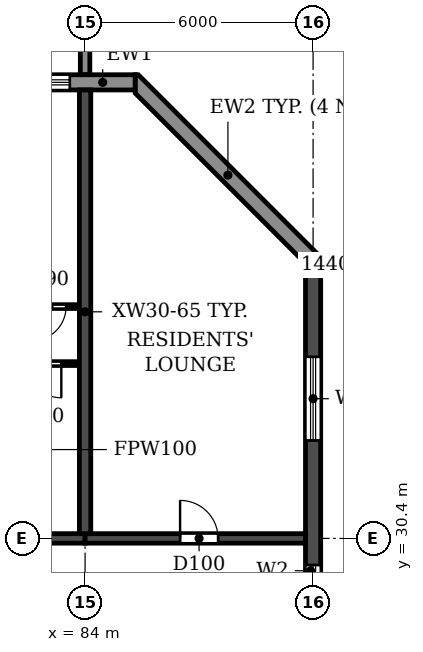
"""IFC4 building model, lengths in metres.
Left out: names, types, materials, properties, quantities, classifications, styles, units other than length and angle.
Written with IfcOpenShell. Run it as: python <this file> out.ifc"""

import sys

from ifc_helpers import new_model, si_unit, direction, frame, frame_2d, origin, place, context, subcontext, project, spatial, polyline, rectangle, outline, extrude, source, transform, mapped, element, fill, save


model = new_model("IFC4")
c1 = context("Model", 3, precision=1e-05, world=origin(), true_north=direction((0.0, 1.0)))
c2 = subcontext(c1, "Body", "Model", "MODEL_VIEW")
j1 = project(units=[si_unit("LENGTHUNIT", "METRE"), si_unit("PLANEANGLEUNIT", "RADIAN")], contexts=[c1])
p1 = place(None, origin())
s1 = spatial("IfcSite", under=j1, at=p1, CompositionType="ELEMENT")
p2 = place(p1, origin())
s2 = spatial("IfcBuilding", under=s1, at=p2, CompositionType="ELEMENT")
p3 = place(p2, frame((0.0, 0.0, 125.7)))
s3 = spatial("IfcBuildingStorey", under=s2, at=p3, CompositionType="ELEMENT", Elevation=125.7)
p4 = place(p3, frame((84.0, 30.525, 0.0), z_axis=(0.0, 0.0, 1.0), x_axis=(0.0, 1.0, 0.0)))
e1 = element("IfcWall", 1, at=p4, inside=s3, PredefinedType="SHEAR", context=c2, shape_type="SweptSolid", body=[
    extrude(rectangle(XDim=11.675, YDim=0.3, at=frame_2d((5.837, 0.0))), origin(), (0.0, 0.0, 1.0), 3.07),
])
p5 = place(p3, frame((90.0, 4.683, 0.0), z_axis=(0.0, 0.0, 1.0), x_axis=(0.0, 1.0, 0.0)))
e2 = element("IfcWall", 2, at=p5, inside=s3, PredefinedType="SHEAR", context=c2, shape_type="SweptSolid", body=[
    extrude(rectangle(XDim=33.034, YDim=0.4, at=frame_2d((16.517, 0.0))), origin(), (0.0, 0.0, 1.0), 3.07),
])
p6 = place(p5, frame((23.817, 0.0, 0.9)))
e3 = element("IfcOpeningElement", 3, at=p6, cuts=e2, PredefinedType="OPENING", context=c2, shape_type="SweptSolid", body=[
    extrude(rectangle(XDim=1.2, YDim=1.5, at=frame_2d((0.6, 0.75))), frame((0.0, 0.21, 0.0), z_axis=(0.0, -1.0, 0.0), x_axis=(1.0, 0.0, 0.0)), (0.0, 0.0, 1.0), 0.42),
])
p7 = place(p5, frame((8.017, 0.0, 0.9)))
e4 = element("IfcOpeningElement", 4, at=p7, cuts=e2, PredefinedType="OPENING", context=c2, shape_type="SweptSolid", body=[
    extrude(rectangle(XDim=1.2, YDim=1.5, at=frame_2d((0.6, 0.75))), frame((0.0, 0.21, 0.0), z_axis=(0.0, -1.0, 0.0), x_axis=(1.0, 0.0, 0.0)), (0.0, 0.0, 1.0), 0.42),
])
p8 = place(p5, frame((28.293, 0.0, 0.6)))
e5 = element("IfcOpeningElement", 5, at=p8, cuts=e2, PredefinedType="OPENING", context=c2, shape_type="SweptSolid", body=[
    extrude(rectangle(XDim=2.2, YDim=1.8, at=frame_2d((1.1, 0.9))), frame((0.0, 0.21, 0.0), z_axis=(0.0, -1.0, 0.0), x_axis=(1.0, 0.0, 0.0)), (0.0, 0.0, 1.0), 0.42),
])
p9 = place(p5, frame((2.541, 0.0, 0.6)))
e6 = element("IfcOpeningElement", 6, at=p9, cuts=e2, PredefinedType="OPENING", context=c2, shape_type="SweptSolid", body=[
    extrude(rectangle(XDim=2.2, YDim=1.8, at=frame_2d((1.1, 0.9))), frame((0.0, 0.21, 0.0), z_axis=(0.0, -1.0, 0.0), x_axis=(1.0, 0.0, 0.0)), (0.0, 0.0, 1.0), 0.42),
])
p10 = place(p3, frame((78.0, 30.4, 0.0), z_axis=(0.0, 0.0, 1.0), x_axis=(1.0, 0.0, 0.0)))
e7 = element("IfcWall", 7, at=p10, inside=s3, PredefinedType="SHEAR", context=c2, shape_type="SweptSolid", body=[
    extrude(rectangle(XDim=6.0, YDim=0.25, at=frame_2d((3.0, 0.0))), origin(), (0.0, 0.0, 1.0), 2.47),
])
p11 = place(p10, frame((2.45, 0.0, 0.0)))
e8 = element("IfcOpeningElement", 8, at=p11, cuts=e7, PredefinedType="OPENING", context=c2, shape_type="SweptSolid", body=[
    extrude(rectangle(XDim=1.0, YDim=2.1, at=frame_2d((0.5, 1.05))), frame((0.0, 0.135, 0.0), z_axis=(0.0, -1.0, 0.0), x_axis=(1.0, 0.0, 0.0)), (0.0, 0.0, 1.0), 0.27),
])
p12 = place(p3, frame((84.0, 30.4, 0.0), z_axis=(0.0, 0.0, 1.0), x_axis=(1.0, 0.0, 0.0)))
e9 = element("IfcWall", 9, at=p12, inside=s3, PredefinedType="SHEAR", context=c2, shape_type="SweptSolid", body=[
    extrude(rectangle(XDim=5.8, YDim=0.25, at=frame_2d((2.9, 0.0))), origin(), (0.0, 0.0, 1.0), 2.47),
])
p13 = place(p12, frame((2.5, 0.0, 0.0)))
e10 = element("IfcOpeningElement", 10, at=p13, cuts=e9, PredefinedType="OPENING", context=c2, shape_type="SweptSolid", body=[
    extrude(rectangle(XDim=1.0, YDim=2.1, at=frame_2d((0.5, 1.05))), frame((0.0, 0.135, 0.0), z_axis=(0.0, -1.0, 0.0), x_axis=(1.0, 0.0, 0.0)), (0.0, 0.0, 1.0), 0.27),
])
p14 = place(p3, origin())
e11 = element("IfcWall", 11, at=p14, inside=s3, PredefinedType="STANDARD", context=c2, shape_type="SweptSolid", body=[
    extrude(outline(polyline([(90.2, 37.717), (90.2, 37.8), (85.4, 42.6), (85.317, 42.6), (85.317, 42.117), (89.717, 37.717), (90.2, 37.717)])), origin(), (0.0, 0.0, 1.0), 3.07),
])
p15 = place(p3, frame((85.317, 42.4, 0.0), z_axis=(0.0, 0.0, 1.0), x_axis=(-1.0, 0.0, 0.0)))
e12 = element("IfcWall", 12, at=p15, inside=s3, PredefinedType="STANDARD", context=c2, shape_type="SweptSolid", body=[
    extrude(rectangle(XDim=68.634, YDim=0.4, at=frame_2d((34.317, 0.0))), origin(), (0.0, 0.0, 1.0), 3.07),
])
p16 = place(p15, frame((64.717, 0.0, 0.9)))
e13 = element("IfcOpeningElement", 13, at=p16, cuts=e12, PredefinedType="OPENING", context=c2, shape_type="SweptSolid", body=[
    extrude(rectangle(XDim=2.2, YDim=1.5, at=frame_2d((1.1, 0.75))), frame((0.0, 0.21, 0.0), z_axis=(0.0, -1.0, 0.0), x_axis=(1.0, 0.0, 0.0)), (0.0, 0.0, 1.0), 0.42),
])
p17 = place(p15, frame((61.917, 0.0, 0.0)))
e14 = element("IfcOpeningElement", 14, at=p17, cuts=e12, PredefinedType="OPENING", context=c2, shape_type="SweptSolid", body=[
    extrude(rectangle(XDim=1.8, YDim=2.4, at=frame_2d((0.9, 1.2))), frame((0.0, 0.21, 0.0), z_axis=(0.0, -1.0, 0.0), x_axis=(1.0, 0.0, 0.0)), (0.0, 0.0, 1.0), 0.42),
])
p18 = place(p15, frame((58.717, 0.0, 0.9)))
e15 = element("IfcOpeningElement", 15, at=p18, cuts=e12, PredefinedType="OPENING", context=c2, shape_type="SweptSolid", body=[
    extrude(rectangle(XDim=2.2, YDim=1.5, at=frame_2d((1.1, 0.75))), frame((0.0, 0.21, 0.0), z_axis=(0.0, -1.0, 0.0), x_axis=(1.0, 0.0, 0.0)), (0.0, 0.0, 1.0), 0.42),
])
p19 = place(p15, frame((55.917, 0.0, 0.0)))
e16 = element("IfcOpeningElement", 16, at=p19, cuts=e12, PredefinedType="OPENING", context=c2, shape_type="SweptSolid", body=[
    extrude(rectangle(XDim=1.8, YDim=2.4, at=frame_2d((0.9, 1.2))), frame((0.0, 0.21, 0.0), z_axis=(0.0, -1.0, 0.0), x_axis=(1.0, 0.0, 0.0)), (0.0, 0.0, 1.0), 0.42),
])
p20 = place(p15, frame((52.717, 0.0, 0.9)))
e17 = element("IfcOpeningElement", 17, at=p20, cuts=e12, PredefinedType="OPENING", context=c2, shape_type="SweptSolid", body=[
    extrude(rectangle(XDim=2.2, YDim=1.5, at=frame_2d((1.1, 0.75))), frame((0.0, 0.21, 0.0), z_axis=(0.0, -1.0, 0.0), x_axis=(1.0, 0.0, 0.0)), (0.0, 0.0, 1.0), 0.42),
])
p21 = place(p15, frame((49.917, 0.0, 0.0)))
e18 = element("IfcOpeningElement", 18, at=p21, cuts=e12, PredefinedType="OPENING", context=c2, shape_type="SweptSolid", body=[
    extrude(rectangle(XDim=1.8, YDim=2.4, at=frame_2d((0.9, 1.2))), frame((0.0, 0.21, 0.0), z_axis=(0.0, -1.0, 0.0), x_axis=(1.0, 0.0, 0.0)), (0.0, 0.0, 1.0), 0.42),
])
p22 = place(p15, frame((46.717, 0.0, 0.9)))
e19 = element("IfcOpeningElement", 19, at=p22, cuts=e12, PredefinedType="OPENING", context=c2, shape_type="SweptSolid", body=[
    extrude(rectangle(XDim=2.2, YDim=1.5, at=frame_2d((1.1, 0.75))), frame((0.0, 0.21, 0.0), z_axis=(0.0, -1.0, 0.0), x_axis=(1.0, 0.0, 0.0)), (0.0, 0.0, 1.0), 0.42),
])
p23 = place(p15, frame((43.917, 0.0, 0.0)))
e20 = element("IfcOpeningElement", 20, at=p23, cuts=e12, PredefinedType="OPENING", context=c2, shape_type="SweptSolid", body=[
    extrude(rectangle(XDim=1.8, YDim=2.4, at=frame_2d((0.9, 1.2))), frame((0.0, 0.21, 0.0), z_axis=(0.0, -1.0, 0.0), x_axis=(1.0, 0.0, 0.0)), (0.0, 0.0, 1.0), 0.42),
])
p24 = place(p15, frame((40.717, 0.0, 0.9)))
e21 = element("IfcOpeningElement", 21, at=p24, cuts=e12, PredefinedType="OPENING", context=c2, shape_type="SweptSolid", body=[
    extrude(rectangle(XDim=2.2, YDim=1.5, at=frame_2d((1.1, 0.75))), frame((0.0, 0.21, 0.0), z_axis=(0.0, -1.0, 0.0), x_axis=(1.0, 0.0, 0.0)), (0.0, 0.0, 1.0), 0.42),
])
p25 = place(p15, frame((37.717, 0.0, 0.9)))
e22 = element("IfcOpeningElement", 22, at=p25, cuts=e12, PredefinedType="OPENING", context=c2, shape_type="SweptSolid", body=[
    extrude(rectangle(XDim=2.2, YDim=1.5, at=frame_2d((1.1, 0.75))), frame((0.0, 0.21, 0.0), z_axis=(0.0, -1.0, 0.0), x_axis=(1.0, 0.0, 0.0)), (0.0, 0.0, 1.0), 0.42),
])
p26 = place(p15, frame((34.917, 0.0, 0.0)))
e23 = element("IfcOpeningElement", 23, at=p26, cuts=e12, PredefinedType="OPENING", context=c2, shape_type="SweptSolid", body=[
    extrude(rectangle(XDim=1.8, YDim=2.4, at=frame_2d((0.9, 1.2))), frame((0.0, 0.21, 0.0), z_axis=(0.0, -1.0, 0.0), x_axis=(1.0, 0.0, 0.0)), (0.0, 0.0, 1.0), 0.42),
])
p27 = place(p15, frame((31.717, 0.0, 0.9)))
e24 = element("IfcOpeningElement", 24, at=p27, cuts=e12, PredefinedType="OPENING", context=c2, shape_type="SweptSolid", body=[
    extrude(rectangle(XDim=2.2, YDim=1.5, at=frame_2d((1.1, 0.75))), frame((0.0, 0.21, 0.0), z_axis=(0.0, -1.0, 0.0), x_axis=(1.0, 0.0, 0.0)), (0.0, 0.0, 1.0), 0.42),
])
p28 = place(p15, frame((28.717, 0.0, 0.9)))
e25 = element("IfcOpeningElement", 25, at=p28, cuts=e12, PredefinedType="OPENING", context=c2, shape_type="SweptSolid", body=[
    extrude(rectangle(XDim=2.2, YDim=1.5, at=frame_2d((1.1, 0.75))), frame((0.0, 0.21, 0.0), z_axis=(0.0, -1.0, 0.0), x_axis=(1.0, 0.0, 0.0)), (0.0, 0.0, 1.0), 0.42),
])
p29 = place(p15, frame((25.717, 0.0, 0.9)))
e26 = element("IfcOpeningElement", 26, at=p29, cuts=e12, PredefinedType="OPENING", context=c2, shape_type="SweptSolid", body=[
    extrude(rectangle(XDim=2.2, YDim=1.5, at=frame_2d((1.1, 0.75))), frame((0.0, 0.21, 0.0), z_axis=(0.0, -1.0, 0.0), x_axis=(1.0, 0.0, 0.0)), (0.0, 0.0, 1.0), 0.42),
])
p30 = place(p15, frame((22.717, 0.0, 0.9)))
e27 = element("IfcOpeningElement", 27, at=p30, cuts=e12, PredefinedType="OPENING", context=c2, shape_type="SweptSolid", body=[
    extrude(rectangle(XDim=2.2, YDim=1.5, at=frame_2d((1.1, 0.75))), frame((0.0, 0.21, 0.0), z_axis=(0.0, -1.0, 0.0), x_axis=(1.0, 0.0, 0.0)), (0.0, 0.0, 1.0), 0.42),
])
p31 = place(p15, frame((19.917, 0.0, 0.0)))
e28 = element("IfcOpeningElement", 28, at=p31, cuts=e12, PredefinedType="OPENING", context=c2, shape_type="SweptSolid", body=[
    extrude(rectangle(XDim=1.8, YDim=2.4, at=frame_2d((0.9, 1.2))), frame((0.0, 0.21, 0.0), z_axis=(0.0, -1.0, 0.0), x_axis=(1.0, 0.0, 0.0)), (0.0, 0.0, 1.0), 0.42),
])
p32 = place(p15, frame((16.917, 0.0, 0.0)))
e29 = element("IfcOpeningElement", 29, at=p32, cuts=e12, PredefinedType="OPENING", context=c2, shape_type="SweptSolid", body=[
    extrude(rectangle(XDim=1.8, YDim=2.4, at=frame_2d((0.9, 1.2))), frame((0.0, 0.21, 0.0), z_axis=(0.0, -1.0, 0.0), x_axis=(1.0, 0.0, 0.0)), (0.0, 0.0, 1.0), 0.42),
])
p33 = place(p15, frame((13.717, 0.0, 0.9)))
e30 = element("IfcOpeningElement", 30, at=p33, cuts=e12, PredefinedType="OPENING", context=c2, shape_type="SweptSolid", body=[
    extrude(rectangle(XDim=2.2, YDim=1.5, at=frame_2d((1.1, 0.75))), frame((0.0, 0.21, 0.0), z_axis=(0.0, -1.0, 0.0), x_axis=(1.0, 0.0, 0.0)), (0.0, 0.0, 1.0), 0.42),
])
p34 = place(p15, frame((10.717, 0.0, 0.9)))
e31 = element("IfcOpeningElement", 31, at=p34, cuts=e12, PredefinedType="OPENING", context=c2, shape_type="SweptSolid", body=[
    extrude(rectangle(XDim=2.2, YDim=1.5, at=frame_2d((1.1, 0.75))), frame((0.0, 0.21, 0.0), z_axis=(0.0, -1.0, 0.0), x_axis=(1.0, 0.0, 0.0)), (0.0, 0.0, 1.0), 0.42),
])
p35 = place(p15, frame((7.717, 0.0, 0.9)))
e32 = element("IfcOpeningElement", 32, at=p35, cuts=e12, PredefinedType="OPENING", context=c2, shape_type="SweptSolid", body=[
    extrude(rectangle(XDim=2.2, YDim=1.5, at=frame_2d((1.1, 0.75))), frame((0.0, 0.21, 0.0), z_axis=(0.0, -1.0, 0.0), x_axis=(1.0, 0.0, 0.0)), (0.0, 0.0, 1.0), 0.42),
])
p36 = place(p15, frame((4.917, 0.0, 0.0)))
e33 = element("IfcOpeningElement", 33, at=p36, cuts=e12, PredefinedType="OPENING", context=c2, shape_type="SweptSolid", body=[
    extrude(rectangle(XDim=1.8, YDim=2.4, at=frame_2d((0.9, 1.2))), frame((0.0, 0.21, 0.0), z_axis=(0.0, -1.0, 0.0), x_axis=(1.0, 0.0, 0.0)), (0.0, 0.0, 1.0), 0.42),
])
p37 = place(p15, frame((1.717, 0.0, 0.9)))
e34 = element("IfcOpeningElement", 34, at=p37, cuts=e12, PredefinedType="OPENING", context=c2, shape_type="SweptSolid", body=[
    extrude(rectangle(XDim=2.2, YDim=1.5, at=frame_2d((1.1, 0.75))), frame((0.0, 0.21, 0.0), z_axis=(0.0, -1.0, 0.0), x_axis=(1.0, 0.0, 0.0)), (0.0, 0.0, 1.0), 0.42),
])
m1 = source(origin(), c2, "Body", "SweptSolid", [
    extrude(outline(polyline([(0.0, 0.0), (0.25, 0.0), (0.25, 3.1), (0.0, 3.1), (0.0, 0.0)])), origin(), (0.0, 0.0, 1.0), 3.1),
])
p38 = place(p3, frame((83.875, 42.6, 0.0)))
e35 = element("IfcWall", 35, at=p38, inside=s3, PredefinedType="STANDARD", context=c2, shape_type="MappedRepresentation", body=[
    mapped(m1, transform((0.0, 0.0, 0.0))),
])
p39 = place(p3, frame((81.8, 35.0, 0.0), z_axis=(0.0, 0.0, 1.0), x_axis=(1.0, 0.0, 0.0)))
e36 = element("IfcWall", 36, at=p39, inside=s3, PredefinedType="PARTITIONING", context=c2, shape_type="SweptSolid", body=[
    extrude(rectangle(XDim=2.04, YDim=0.1, at=frame_2d((1.02, 0.0))), origin(), (0.0, 0.0, 1.0), 3.07),
])
p40 = place(p39, frame((0.675, 0.0, 0.0)))
e37 = element("IfcOpeningElement", 37, at=p40, cuts=e36, PredefinedType="OPENING", context=c2, shape_type="SweptSolid", body=[
    extrude(rectangle(XDim=0.9, YDim=2.1, at=frame_2d((0.45, 1.05))), frame((0.0, 0.06, 0.0), z_axis=(0.0, -1.0, 0.0), x_axis=(1.0, 0.0, 0.0)), (0.0, 0.0, 1.0), 0.12),
])
p41 = place(p3, frame((80.95, 36.5, 0.0), z_axis=(0.0, 0.0, 1.0), x_axis=(1.0, 0.0, 0.0)))
e38 = element("IfcWall", 38, at=p41, inside=s3, PredefinedType="PARTITIONING", context=c2, shape_type="SweptSolid", body=[
    extrude(rectangle(XDim=2.89, YDim=0.1, at=frame_2d((1.445, 0.0))), origin(), (0.0, 0.0, 1.0), 3.07),
])
p42 = place(p41, frame((1.65, 0.0, 0.0)))
e39 = element("IfcOpeningElement", 39, at=p42, cuts=e38, PredefinedType="OPENING", context=c2, shape_type="SweptSolid", body=[
    extrude(rectangle(XDim=0.9, YDim=2.1, at=frame_2d((0.45, 1.05))), frame((0.0, 0.06, 0.0), z_axis=(0.0, -1.0, 0.0), x_axis=(1.0, 0.0, 0.0)), (0.0, 0.0, 1.0), 0.12),
])
p43 = place(p6, origin())
e40 = element("IfcWindow", 40, at=p43, inside=s3, PartitioningType="SINGLE_PANEL", PredefinedType="WINDOW", context=c2, shape_type="SweptSolid", body=[
    extrude(rectangle(XDim=1.2, YDim=1.5, at=frame_2d((0.6, 0.75))), frame((0.0, 0.03, 0.0), z_axis=(0.0, -1.0, 0.0), x_axis=(1.0, 0.0, 0.0)), (0.0, 0.0, 1.0), 0.06),
])
fill(e3, e40)
p44 = place(p8, origin())
e41 = element("IfcWindow", 41, at=p44, inside=s3, PartitioningType="DOUBLE_PANEL_HORIZONTAL", PredefinedType="WINDOW", context=c2, shape_type="SweptSolid", body=[
    extrude(rectangle(XDim=2.2, YDim=1.8, at=frame_2d((1.1, 0.9))), frame((0.0, 0.03, 0.0), z_axis=(0.0, -1.0, 0.0), x_axis=(1.0, 0.0, 0.0)), (0.0, 0.0, 1.0), 0.06),
])
fill(e5, e41)
p45 = place(p37, origin())
e42 = element("IfcWindow", 42, at=p45, inside=s3, PartitioningType="DOUBLE_PANEL_HORIZONTAL", PredefinedType="WINDOW", context=c2, shape_type="SweptSolid", body=[
    extrude(rectangle(XDim=2.2, YDim=1.5, at=frame_2d((1.1, 0.75))), frame((0.0, 0.03, 0.0), z_axis=(0.0, -1.0, 0.0), x_axis=(1.0, 0.0, 0.0)), (0.0, 0.0, 1.0), 0.06),
])
fill(e34, e42)
p46 = place(p40, frame((0.9, 0.0, 0.0), z_axis=(0.0, 0.0, 1.0), x_axis=(-1.0, 0.0, 0.0)))
e43 = element("IfcDoor", 43, at=p46, inside=s3, OperationType="SINGLE_SWING_LEFT", PredefinedType="DOOR", context=c2, shape_type="SweptSolid", body=[
    extrude(rectangle(XDim=0.9, YDim=2.1, at=frame_2d((0.45, 1.05))), frame((0.0, 0.025, 0.0), z_axis=(0.0, -1.0, 0.0), x_axis=(1.0, 0.0, 0.0)), (0.0, 0.0, 1.0), 0.05),
])
fill(e37, e43)
p47 = place(p42, frame((0.9, 0.0, 0.0), z_axis=(0.0, 0.0, 1.0), x_axis=(-1.0, 0.0, 0.0)))
e44 = element("IfcDoor", 44, at=p47, inside=s3, OperationType="SINGLE_SWING_RIGHT", PredefinedType="DOOR", context=c2, shape_type="SweptSolid", body=[
    extrude(rectangle(XDim=0.9, YDim=2.1, at=frame_2d((0.45, 1.05))), frame((0.0, 0.025, 0.0), z_axis=(0.0, -1.0, 0.0), x_axis=(1.0, 0.0, 0.0)), (0.0, 0.0, 1.0), 0.05),
])
fill(e39, e44)
p48 = place(p13, origin())
e45 = element("IfcDoor", 45, at=p48, inside=s3, OperationType="SINGLE_SWING_LEFT", PredefinedType="DOOR", context=c2, shape_type="SweptSolid", body=[
    extrude(rectangle(XDim=1.0, YDim=2.1, at=frame_2d((0.5, 1.05))), frame((0.0, 0.025, 0.0), z_axis=(0.0, -1.0, 0.0), x_axis=(1.0, 0.0, 0.0)), (0.0, 0.0, 1.0), 0.05),
])
fill(e10, e45)
save(model, sys.argv[1])
